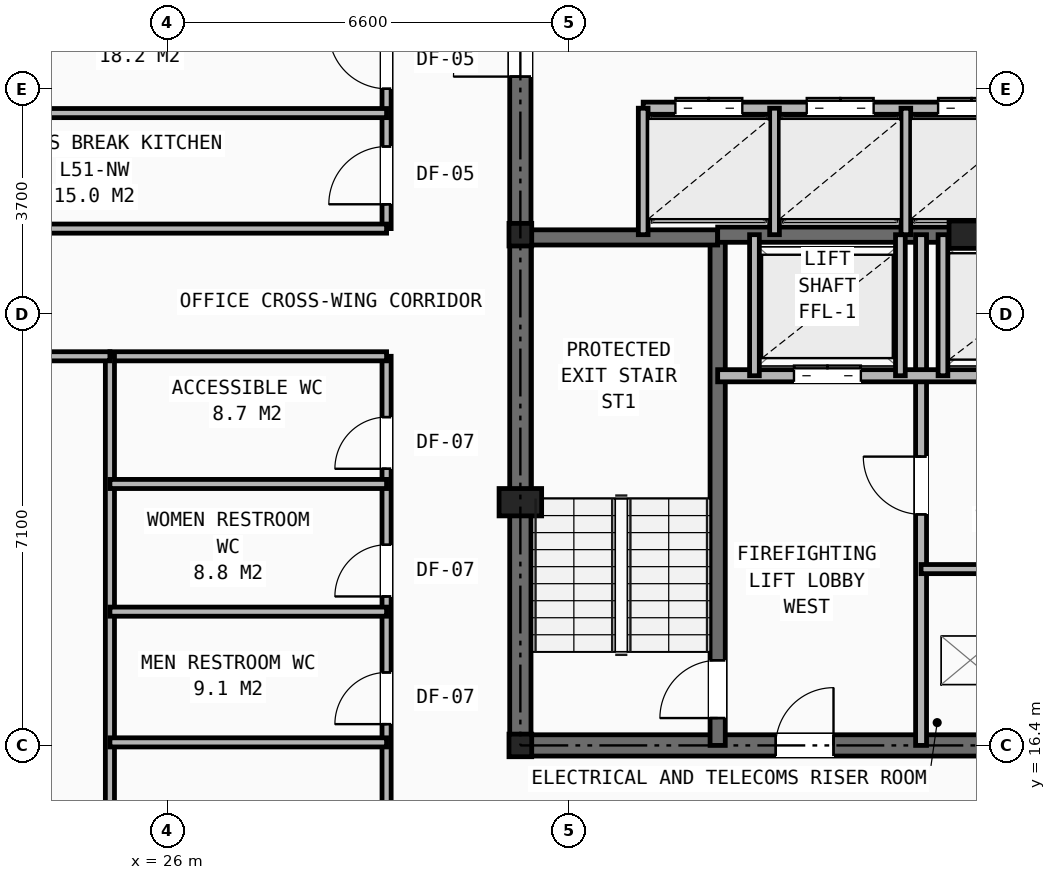
"""IFC4 building model, lengths in metres.
Left out: names, types, materials, properties, quantities, classifications, styles, units other than length and angle.
Written with IfcOpenShell. Run it as: python <this file> out.ifc"""

import sys

from ifc_helpers import new_model, si_unit, direction, frame, frame_2d, origin, origin_2d, place, context, subcontext, project, spatial, rectangle, i_section, extrude, element, fill, save


model = new_model("IFC4")
c1 = context("Model", 3, precision=1e-05, world=origin(), true_north=direction((0.0, 1.0)))
c2 = subcontext(c1, "Body", "Model", "MODEL_VIEW")
j1 = project(units=[si_unit("LENGTHUNIT", "METRE"), si_unit("PLANEANGLEUNIT", "RADIAN")], contexts=[c1])
p1 = place(None, origin())
s1 = spatial("IfcSite", under=j1, at=p1, CompositionType="ELEMENT")
p2 = place(p1, origin())
s2 = spatial("IfcBuilding", under=s1, at=p2, CompositionType="ELEMENT")
p3 = place(p2, frame((0.0, 0.0, 179.25)))
s3 = spatial("IfcBuildingStorey", under=s2, at=p3, CompositionType="ELEMENT", Elevation=179.25)
for number, where, z_axis, x_axis in (
    (1, (31.8, 16.4, 0.0), (0.0, 0.0, 1.0), (1.0, 0.0, 0.0)),
    (2, (31.8, 24.8, 0.0), (0.0, 0.0, 1.0), (1.0, 0.0, 0.0)),
):
    element("IfcColumn", number, at=place(p3, frame(where, z_axis=z_axis, x_axis=x_axis)), inside=s3, PredefinedType="COLUMN", context=c2, shape_type="SweptSolid", body=[
        extrude(i_section(OverallWidth=0.374, OverallDepth=0.372, WebThickness=0.016, FlangeThickness=0.026, at=origin_2d()), origin(), (0.0, 0.0, 1.0), 3.45),
    ])
for number, where, z_axis, x_axis in (
    (3, (31.8, 20.4, 0.0), (0.0, 0.0, 1.0), (1.0, 0.0, 0.0)),
    (4, (39.2, 24.8, 0.0), (0.0, 0.0, 1.0), (1.0, 0.0, 0.0)),
):
    element("IfcColumn", number, at=place(p3, frame(where, z_axis=z_axis, x_axis=x_axis)), inside=s3, PredefinedType="PILASTER", context=c2, shape_type="SweptSolid", body=[
        extrude(rectangle(XDim=0.7, YDim=0.45, at=origin_2d()), origin(), (0.0, 0.0, 1.0), 3.45),
    ])
p4 = place(p3, frame((31.8, 16.4, 0.0), z_axis=(0.0, 0.0, 1.0), x_axis=(1.0, 0.0, 0.0)))
e5 = element("IfcWall", 5, at=p4, inside=s3, PredefinedType="SHEAR", context=c2, shape_type="SweptSolid", body=[
    extrude(rectangle(XDim=16.4, YDim=0.35, at=frame_2d((8.2, 0.0))), origin(), (0.0, 0.0, 1.0), 3.21),
])
p5 = place(p4, frame((7.75, 0.0, 0.0)))
e6 = element("IfcOpeningElement", 6, at=p5, cuts=e5, PredefinedType="OPENING", context=c2, shape_type="SweptSolid", body=[
    extrude(rectangle(XDim=0.9, YDim=2.1, at=frame_2d((0.45, 1.05))), frame((0.0, 0.185, 0.0), z_axis=(0.0, -1.0, 0.0), x_axis=(1.0, 0.0, 0.0)), (0.0, 0.0, 1.0), 0.37),
])
p6 = place(p4, frame((4.2, 0.0, 0.0)))
e7 = element("IfcOpeningElement", 7, at=p6, cuts=e5, PredefinedType="OPENING", context=c2, shape_type="SweptSolid", body=[
    extrude(rectangle(XDim=0.95, YDim=2.1, at=frame_2d((0.475, 1.05))), frame((0.0, 0.185, 0.0), z_axis=(0.0, -1.0, 0.0), x_axis=(1.0, 0.0, 0.0)), (0.0, 0.0, 1.0), 0.37),
])
p7 = place(p4, frame((10.6, 0.0, 0.0)))
e8 = element("IfcOpeningElement", 8, at=p7, cuts=e5, PredefinedType="OPENING", context=c2, shape_type="SweptSolid", body=[
    extrude(rectangle(XDim=0.95, YDim=2.1, at=frame_2d((0.475, 1.05))), frame((0.0, 0.185, 0.0), z_axis=(0.0, -1.0, 0.0), x_axis=(1.0, 0.0, 0.0)), (0.0, 0.0, 1.0), 0.37),
])
p8 = place(p3, frame((31.8, 16.4, 0.0), z_axis=(0.0, 0.0, 1.0), x_axis=(0.0, 1.0, 0.0)))
e9 = element("IfcWall", 9, at=p8, inside=s3, PredefinedType="SHEAR", context=c2, shape_type="SweptSolid", body=[
    extrude(rectangle(XDim=14.8, YDim=0.35, at=frame_2d((7.4, 0.0))), origin(), (0.0, 0.0, 1.0), 3.21),
])
p9 = place(p8, frame((11.0, 0.0, 0.0)))
e10 = element("IfcOpeningElement", 10, at=p9, cuts=e9, PredefinedType="OPENING", context=c2, shape_type="SweptSolid", body=[
    extrude(rectangle(XDim=1.1, YDim=2.15, at=frame_2d((0.55, 1.075))), frame((0.0, 0.185, 0.0), z_axis=(0.0, -1.0, 0.0), x_axis=(1.0, 0.0, 0.0)), (0.0, 0.0, 1.0), 0.37),
])
p10 = place(p3, frame((35.045, 16.4, 0.0), z_axis=(0.0, 0.0, 1.0), x_axis=(0.0, 1.0, 0.0)))
e11 = element("IfcWall", 11, at=p10, inside=s3, PredefinedType="SHEAR", context=c2, shape_type="SweptSolid", body=[
    extrude(rectangle(XDim=8.4, YDim=0.25, at=frame_2d((4.2, 0.0))), origin(), (0.0, 0.0, 1.0), 3.21),
])
p11 = place(p10, frame((0.45, 0.0, 0.0)))
e12 = element("IfcOpeningElement", 12, at=p11, cuts=e11, PredefinedType="OPENING", context=c2, shape_type="SweptSolid", body=[
    extrude(rectangle(XDim=0.95, YDim=2.1, at=frame_2d((0.475, 1.05))), frame((0.0, 0.135, 0.0), z_axis=(0.0, -1.0, 0.0), x_axis=(1.0, 0.0, 0.0)), (0.0, 0.0, 1.0), 0.27),
])
p12 = place(p3, frame((31.8, 24.755, 0.0), z_axis=(0.0, 0.0, 1.0), x_axis=(1.0, 0.0, 0.0)))
e13 = element("IfcWall", 13, at=p12, inside=s3, PredefinedType="SHEAR", context=c2, shape_type="SweptSolid", body=[
    extrude(rectangle(XDim=3.245, YDim=0.25, at=frame_2d((1.623, 0.0))), origin(), (0.0, 0.0, 1.0), 3.21),
])
p13 = place(p3, frame((35.045, 24.8, 0.0), z_axis=(0.0, 0.0, 1.0), x_axis=(1.0, 0.0, 0.0)))
e14 = element("IfcWall", 14, at=p13, inside=s3, PredefinedType="SHEAR", context=c2, shape_type="SweptSolid", body=[
    extrude(rectangle(XDim=9.91, YDim=0.25, at=frame_2d((4.955, 0.0))), origin(), (0.0, 0.0, 1.0), 3.21),
])
p14 = place(p3, frame((38.39, 16.4, 0.0), z_axis=(0.0, 0.0, 1.0), x_axis=(0.0, 1.0, 0.0)))
e15 = element("IfcWall", 15, at=p14, inside=s3, PredefinedType="PARTITIONING", context=c2, shape_type="SweptSolid", body=[
    extrude(rectangle(XDim=8.4, YDim=0.18, at=frame_2d((4.2, 0.0))), origin(), (0.0, 0.0, 1.0), 2.665),
])
p15 = place(p14, frame((3.8, 0.0, 0.0)))
e16 = element("IfcOpeningElement", 16, at=p15, cuts=e15, PredefinedType="OPENING", context=c2, shape_type="SweptSolid", body=[
    extrude(rectangle(XDim=0.95, YDim=2.1, at=frame_2d((0.475, 1.05))), frame((0.0, 0.1, 0.0), z_axis=(0.0, -1.0, 0.0), x_axis=(1.0, 0.0, 0.0)), (0.0, 0.0, 1.0), 0.2),
])
p16 = place(p3, frame((35.045, 22.48, 0.0), z_axis=(0.0, 0.0, 1.0), x_axis=(1.0, 0.0, 0.0)))
e17 = element("IfcWall", 17, at=p16, inside=s3, PredefinedType="SOLIDWALL", context=c2, shape_type="SweptSolid", body=[
    extrude(rectangle(XDim=9.91, YDim=0.2, at=frame_2d((4.955, 0.0))), origin(), (0.0, 0.0, 1.0), 3.21),
])
p17 = place(p16, frame((1.255, 0.0, 0.0)))
e18 = element("IfcOpeningElement", 18, at=p17, cuts=e17, PredefinedType="OPENING", context=c2, shape_type="SweptSolid", body=[
    extrude(rectangle(XDim=1.1, YDim=2.15, at=frame_2d((0.55, 1.075))), frame((0.0, 0.11, 0.0), z_axis=(0.0, -1.0, 0.0), x_axis=(1.0, 0.0, 0.0)), (0.0, 0.0, 1.0), 0.22),
])
p18 = place(p16, frame((7.555, 0.0, 0.0)))
e19 = element("IfcOpeningElement", 19, at=p18, cuts=e17, PredefinedType="OPENING", context=c2, shape_type="SweptSolid", body=[
    extrude(rectangle(XDim=1.1, YDim=2.15, at=frame_2d((0.55, 1.075))), frame((0.0, 0.11, 0.0), z_axis=(0.0, -1.0, 0.0), x_axis=(1.0, 0.0, 0.0)), (0.0, 0.0, 1.0), 0.22),
])
p19 = place(p16, frame((4.405, 0.0, 0.0)))
e20 = element("IfcOpeningElement", 20, at=p19, cuts=e17, PredefinedType="OPENING", context=c2, shape_type="SweptSolid", body=[
    extrude(rectangle(XDim=1.1, YDim=2.15, at=frame_2d((0.55, 1.075))), frame((0.0, 0.11, 0.0), z_axis=(0.0, -1.0, 0.0), x_axis=(1.0, 0.0, 0.0)), (0.0, 0.0, 1.0), 0.22),
])
p20 = place(p3, frame((38.39, 19.3, 0.0), z_axis=(0.0, 0.0, 1.0), x_axis=(1.0, 0.0, 0.0)))
e21 = element("IfcWall", 21, at=p20, inside=s3, PredefinedType="PARTITIONING", context=c2, shape_type="SweptSolid", body=[
    extrude(rectangle(XDim=3.22, YDim=0.15, at=frame_2d((1.61, 0.0))), origin(), (0.0, 0.0, 1.0), 3.21),
])
for number, where, z_axis, x_axis in (
    (22, (35.65, 22.48, 0.0), (0.0, 0.0, 1.0), (0.0, 1.0, 0.0)),
    (23, (38.05, 22.48, 0.0), (0.0, 0.0, 1.0), (0.0, 1.0, 0.0)),
    (24, (38.75, 22.48, 0.0), (0.0, 0.0, 1.0), (0.0, 1.0, 0.0)),
):
    element("IfcWall", number, at=place(p3, frame(where, z_axis=z_axis, x_axis=x_axis)), inside=s3, PredefinedType="SOLIDWALL", context=c2, shape_type="SweptSolid", body=[
        extrude(rectangle(XDim=2.32, YDim=0.16, at=frame_2d((1.16, 0.0))), origin(), (0.0, 0.0, 1.0), 3.21),
    ])
p21 = place(p3, frame((33.82, 26.88, 0.0), z_axis=(0.0, 0.0, 1.0), x_axis=(1.0, 0.0, 0.0)))
e25 = element("IfcWall", 25, at=p21, inside=s3, PredefinedType="SOLIDWALL", context=c2, shape_type="SweptSolid", body=[
    extrude(rectangle(XDim=14.38, YDim=0.2, at=frame_2d((7.19, 0.0))), origin(), (0.0, 0.0, 1.0), 2.665),
])
p22 = place(p21, frame((0.53, 0.0, 0.0)))
e26 = element("IfcOpeningElement", 26, at=p22, cuts=e25, PredefinedType="OPENING", context=c2, shape_type="SweptSolid", body=[
    extrude(rectangle(XDim=1.1, YDim=2.15, at=frame_2d((0.55, 1.075))), frame((0.0, 0.11, 0.0), z_axis=(0.0, -1.0, 0.0), x_axis=(1.0, 0.0, 0.0)), (0.0, 0.0, 1.0), 0.22),
])
p23 = place(p21, frame((2.69, 0.0, 0.0)))
e27 = element("IfcOpeningElement", 27, at=p23, cuts=e25, PredefinedType="OPENING", context=c2, shape_type="SweptSolid", body=[
    extrude(rectangle(XDim=1.1, YDim=2.15, at=frame_2d((0.55, 1.075))), frame((0.0, 0.11, 0.0), z_axis=(0.0, -1.0, 0.0), x_axis=(1.0, 0.0, 0.0)), (0.0, 0.0, 1.0), 0.22),
])
p24 = place(p21, frame((4.85, 0.0, 0.0)))
e28 = element("IfcOpeningElement", 28, at=p24, cuts=e25, PredefinedType="OPENING", context=c2, shape_type="SweptSolid", body=[
    extrude(rectangle(XDim=1.1, YDim=2.15, at=frame_2d((0.55, 1.075))), frame((0.0, 0.11, 0.0), z_axis=(0.0, -1.0, 0.0), x_axis=(1.0, 0.0, 0.0)), (0.0, 0.0, 1.0), 0.22),
])
p25 = place(p21, frame((7.01, 0.0, 0.0)))
e29 = element("IfcOpeningElement", 29, at=p25, cuts=e25, PredefinedType="OPENING", context=c2, shape_type="SweptSolid", body=[
    extrude(rectangle(XDim=1.1, YDim=2.15, at=frame_2d((0.55, 1.075))), frame((0.0, 0.11, 0.0), z_axis=(0.0, -1.0, 0.0), x_axis=(1.0, 0.0, 0.0)), (0.0, 0.0, 1.0), 0.22),
])
for number, where, z_axis, x_axis in (
    (30, (33.82, 24.8, 0.0), (0.0, 0.0, 1.0), (0.0, 1.0, 0.0)),
    (31, (35.98, 24.8, 0.0), (0.0, 0.0, 1.0), (0.0, 1.0, 0.0)),
    (32, (38.14, 24.8, 0.0), (0.0, 0.0, 1.0), (0.0, 1.0, 0.0)),
):
    element("IfcWall", number, at=place(p3, frame(where, z_axis=z_axis, x_axis=x_axis)), inside=s3, PredefinedType="SOLIDWALL", context=c2, shape_type="SweptSolid", body=[
        extrude(rectangle(XDim=2.08, YDim=0.16, at=frame_2d((1.04, 0.0))), origin(), (0.0, 0.0, 1.0), 3.21),
    ])
p26 = place(p3, frame((29.6, 14.1, 0.0), z_axis=(0.0, 0.0, 1.0), x_axis=(0.0, 1.0, 0.0)))
e33 = element("IfcWall", 33, at=p26, inside=s3, PredefinedType="PARTITIONING", context=c2, shape_type="SweptSolid", body=[
    extrude(rectangle(XDim=8.7, YDim=0.15, at=frame_2d((4.35, 0.0))), origin(), (0.0, 0.0, 1.0), 3.21),
])
p27 = place(p26, frame((2.65, 0.0, 0.0)))
e34 = element("IfcOpeningElement", 34, at=p27, cuts=e33, PredefinedType="OPENING", context=c2, shape_type="SweptSolid", body=[
    extrude(rectangle(XDim=0.85, YDim=2.05, at=frame_2d((0.425, 1.025))), frame((0.0, 0.085, 0.0), z_axis=(0.0, -1.0, 0.0), x_axis=(1.0, 0.0, 0.0)), (0.0, 0.0, 1.0), 0.17),
])
p28 = place(p26, frame((4.75, 0.0, 0.0)))
e35 = element("IfcOpeningElement", 35, at=p28, cuts=e33, PredefinedType="OPENING", context=c2, shape_type="SweptSolid", body=[
    extrude(rectangle(XDim=0.85, YDim=2.05, at=frame_2d((0.425, 1.025))), frame((0.0, 0.085, 0.0), z_axis=(0.0, -1.0, 0.0), x_axis=(1.0, 0.0, 0.0)), (0.0, 0.0, 1.0), 0.17),
])
p29 = place(p26, frame((6.85, 0.0, 0.0)))
e36 = element("IfcOpeningElement", 36, at=p29, cuts=e33, PredefinedType="OPENING", context=c2, shape_type="SweptSolid", body=[
    extrude(rectangle(XDim=0.85, YDim=2.05, at=frame_2d((0.425, 1.025))), frame((0.0, 0.085, 0.0), z_axis=(0.0, -1.0, 0.0), x_axis=(1.0, 0.0, 0.0)), (0.0, 0.0, 1.0), 0.17),
])
p30 = place(p3, frame((29.6, 24.9, 0.0), z_axis=(0.0, 0.0, 1.0), x_axis=(0.0, 1.0, 0.0)))
e37 = element("IfcWall", 37, at=p30, inside=s3, PredefinedType="PARTITIONING", context=c2, shape_type="SweptSolid", body=[
    extrude(rectangle(XDim=13.9, YDim=0.15, at=frame_2d((6.95, 0.0))), origin(), (0.0, 0.0, 1.0), 2.225),
])
p31 = place(p30, frame((0.4, 0.0, 0.0)))
e38 = element("IfcOpeningElement", 38, at=p31, cuts=e37, PredefinedType="OPENING", context=c2, shape_type="SweptSolid", body=[
    extrude(rectangle(XDim=0.95, YDim=2.1, at=frame_2d((0.475, 1.05))), frame((0.0, 0.085, 0.0), z_axis=(0.0, -1.0, 0.0), x_axis=(1.0, 0.0, 0.0)), (0.0, 0.0, 1.0), 0.17),
])
p32 = place(p30, frame((2.3, 0.0, 0.0)))
e39 = element("IfcOpeningElement", 39, at=p32, cuts=e37, PredefinedType="OPENING", context=c2, shape_type="SweptSolid", body=[
    extrude(rectangle(XDim=0.95, YDim=2.1, at=frame_2d((0.475, 1.05))), frame((0.0, 0.085, 0.0), z_axis=(0.0, -1.0, 0.0), x_axis=(1.0, 0.0, 0.0)), (0.0, 0.0, 1.0), 0.17),
])
p33 = place(p30, frame((5.0, 0.0, 0.0)))
e40 = element("IfcOpeningElement", 40, at=p33, cuts=e37, PredefinedType="OPENING", context=c2, shape_type="SweptSolid", body=[
    extrude(rectangle(XDim=0.95, YDim=2.1, at=frame_2d((0.475, 1.05))), frame((0.0, 0.085, 0.0), z_axis=(0.0, -1.0, 0.0), x_axis=(1.0, 0.0, 0.0)), (0.0, 0.0, 1.0), 0.17),
])
p34 = place(p30, frame((7.7, 0.0, 0.0)))
e41 = element("IfcOpeningElement", 41, at=p34, cuts=e37, PredefinedType="OPENING", context=c2, shape_type="SweptSolid", body=[
    extrude(rectangle(XDim=0.95, YDim=2.1, at=frame_2d((0.475, 1.05))), frame((0.0, 0.085, 0.0), z_axis=(0.0, -1.0, 0.0), x_axis=(1.0, 0.0, 0.0)), (0.0, 0.0, 1.0), 0.17),
])
p35 = place(p30, frame((10.5, 0.0, 0.0)))
e42 = element("IfcOpeningElement", 42, at=p35, cuts=e37, PredefinedType="OPENING", context=c2, shape_type="SweptSolid", body=[
    extrude(rectangle(XDim=0.95, YDim=2.1, at=frame_2d((0.475, 1.05))), frame((0.0, 0.085, 0.0), z_axis=(0.0, -1.0, 0.0), x_axis=(1.0, 0.0, 0.0)), (0.0, 0.0, 1.0), 0.17),
])
p36 = place(p3, frame((25.05, 22.8, 0.0), z_axis=(0.0, 0.0, 1.0), x_axis=(1.0, 0.0, 0.0)))
e43 = element("IfcWall", 43, at=p36, inside=s3, PredefinedType="PARTITIONING", context=c2, shape_type="SweptSolid", body=[
    extrude(rectangle(XDim=4.55, YDim=0.15, at=frame_2d((2.275, 0.0))), origin(), (0.0, 0.0, 1.0), 3.21),
])
p37 = place(p3, frame((20.394, 24.9, 0.0), z_axis=(0.0, 0.0, 1.0), x_axis=(1.0, 0.0, 0.0)))
e44 = element("IfcWall", 44, at=p37, inside=s3, PredefinedType="PARTITIONING", context=c2, shape_type="SweptSolid", body=[
    extrude(rectangle(XDim=9.206, YDim=0.15, at=frame_2d((4.603, 0.0))), origin(), (0.0, 0.0, 1.0), 2.589),
])
p38 = place(p3, frame((25.05, 14.1, 0.0), z_axis=(0.0, 0.0, 1.0), x_axis=(0.0, 1.0, 0.0)))
e45 = element("IfcWall", 45, at=p38, inside=s3, PredefinedType="PARTITIONING", context=c2, shape_type="SweptSolid", body=[
    extrude(rectangle(XDim=8.7, YDim=0.15, at=frame_2d((4.35, 0.0))), origin(), (0.0, 0.0, 1.0), 3.21),
])
for number, where, z_axis, x_axis in (
    (46, (25.05, 16.45, 0.0), (0.0, 0.0, 1.0), (1.0, 0.0, 0.0)),
    (47, (25.05, 18.6, 0.0), (0.0, 0.0, 1.0), (1.0, 0.0, 0.0)),
    (48, (25.05, 20.7, 0.0), (0.0, 0.0, 1.0), (1.0, 0.0, 0.0)),
):
    element("IfcWall", number, at=place(p3, frame(where, z_axis=z_axis, x_axis=x_axis)), inside=s3, PredefinedType="PARTITIONING", context=c2, shape_type="SweptSolid", body=[
        extrude(rectangle(XDim=4.55, YDim=0.15, at=frame_2d((2.275, 0.0))), origin(), (0.0, 0.0, 1.0), 3.21),
    ])
p39 = place(p3, frame((20.5, 22.8, 0.0), z_axis=(0.0, 0.0, 1.0), x_axis=(1.0, 0.0, 0.0)))
e49 = element("IfcWall", 49, at=p39, inside=s3, PredefinedType="PARTITIONING", context=c2, shape_type="SweptSolid", body=[
    extrude(rectangle(XDim=4.55, YDim=0.15, at=frame_2d((2.275, 0.0))), origin(), (0.0, 0.0, 1.0), 3.21),
])
p40 = place(p39, frame((1.4, 0.0, 0.0)))
e50 = element("IfcOpeningElement", 50, at=p40, cuts=e49, PredefinedType="OPENING", context=c2, shape_type="SweptSolid", body=[
    extrude(rectangle(XDim=0.95, YDim=2.1, at=frame_2d((0.475, 1.05))), frame((0.0, 0.085, 0.0), z_axis=(0.0, -1.0, 0.0), x_axis=(1.0, 0.0, 0.0)), (0.0, 0.0, 1.0), 0.17),
])
p41 = place(p3, frame((21.588, 26.8, 0.0), z_axis=(0.0, 0.0, 1.0), x_axis=(1.0, 0.0, 0.0)))
e51 = element("IfcWall", 51, at=p41, inside=s3, PredefinedType="PARTITIONING", context=c2, shape_type="SweptSolid", body=[
    extrude(rectangle(XDim=8.012, YDim=0.15, at=frame_2d((4.006, 0.0))), origin(), (0.0, 0.0, 1.0), 2.589),
])
p42 = place(p15, origin())
e52 = element("IfcDoor", 52, at=p42, inside=s3, OperationType="SINGLE_SWING_RIGHT", PredefinedType="DOOR", context=c2, shape_type="SweptSolid", body=[
    extrude(rectangle(XDim=0.95, YDim=2.1, at=frame_2d((0.475, 1.05))), frame((0.0, 0.025, 0.0), z_axis=(0.0, -1.0, 0.0), x_axis=(1.0, 0.0, 0.0)), (0.0, 0.0, 1.0), 0.05),
])
fill(e16, e52)
p43 = place(p11, origin())
e53 = element("IfcDoor", 53, at=p43, inside=s3, OperationType="SINGLE_SWING_LEFT", PredefinedType="DOOR", context=c2, shape_type="SweptSolid", body=[
    extrude(rectangle(XDim=0.95, YDim=2.1, at=frame_2d((0.475, 1.05))), frame((0.0, 0.025, 0.0), z_axis=(0.0, -1.0, 0.0), x_axis=(1.0, 0.0, 0.0)), (0.0, 0.0, 1.0), 0.05),
])
fill(e12, e53)
p44 = place(p6, origin())
e54 = element("IfcDoor", 54, at=p44, inside=s3, OperationType="SINGLE_SWING_RIGHT", PredefinedType="DOOR", context=c2, shape_type="SweptSolid", body=[
    extrude(rectangle(XDim=0.95, YDim=2.1, at=frame_2d((0.475, 1.05))), frame((0.0, 0.025, 0.0), z_axis=(0.0, -1.0, 0.0), x_axis=(1.0, 0.0, 0.0)), (0.0, 0.0, 1.0), 0.05),
])
fill(e7, e54)
p45 = place(p17, origin())
e55 = element("IfcDoor", 55, at=p45, inside=s3, OperationType="DOUBLE_DOOR_SLIDING", PredefinedType="DOOR", context=c2, shape_type="SweptSolid", body=[
    extrude(rectangle(XDim=1.1, YDim=2.15, at=frame_2d((0.55, 1.075))), frame((0.0, 0.025, 0.0), z_axis=(0.0, -1.0, 0.0), x_axis=(1.0, 0.0, 0.0)), (0.0, 0.0, 1.0), 0.05),
])
fill(e18, e55)
p46 = place(p9, origin())
e56 = element("IfcDoor", 56, at=p46, inside=s3, OperationType="SINGLE_SWING_LEFT", PredefinedType="DOOR", context=c2, shape_type="SweptSolid", body=[
    extrude(rectangle(XDim=1.1, YDim=2.15, at=frame_2d((0.55, 1.075))), frame((0.0, 0.025, 0.0), z_axis=(0.0, -1.0, 0.0), x_axis=(1.0, 0.0, 0.0)), (0.0, 0.0, 1.0), 0.05),
])
fill(e10, e56)
p47 = place(p22, origin())
e57 = element("IfcDoor", 57, at=p47, inside=s3, OperationType="DOUBLE_DOOR_SLIDING", PredefinedType="DOOR", context=c2, shape_type="SweptSolid", body=[
    extrude(rectangle(XDim=1.1, YDim=2.15, at=frame_2d((0.55, 1.075))), frame((0.0, 0.025, 0.0), z_axis=(0.0, -1.0, 0.0), x_axis=(1.0, 0.0, 0.0)), (0.0, 0.0, 1.0), 0.05),
])
fill(e26, e57)
p48 = place(p23, origin())
e58 = element("IfcDoor", 58, at=p48, inside=s3, OperationType="DOUBLE_DOOR_SLIDING", PredefinedType="DOOR", context=c2, shape_type="SweptSolid", body=[
    extrude(rectangle(XDim=1.1, YDim=2.15, at=frame_2d((0.55, 1.075))), frame((0.0, 0.025, 0.0), z_axis=(0.0, -1.0, 0.0), x_axis=(1.0, 0.0, 0.0)), (0.0, 0.0, 1.0), 0.05),
])
fill(e27, e58)
p49 = place(p24, origin())
e59 = element("IfcDoor", 59, at=p49, inside=s3, OperationType="DOUBLE_DOOR_SLIDING", PredefinedType="DOOR", context=c2, shape_type="SweptSolid", body=[
    extrude(rectangle(XDim=1.1, YDim=2.15, at=frame_2d((0.55, 1.075))), frame((0.0, 0.025, 0.0), z_axis=(0.0, -1.0, 0.0), x_axis=(1.0, 0.0, 0.0)), (0.0, 0.0, 1.0), 0.05),
])
fill(e28, e59)
p50 = place(p27, origin())
e60 = element("IfcDoor", 60, at=p50, inside=s3, OperationType="SINGLE_SWING_LEFT", PredefinedType="DOOR", context=c2, shape_type="SweptSolid", body=[
    extrude(rectangle(XDim=0.85, YDim=2.05, at=frame_2d((0.425, 1.025))), frame((0.0, 0.025, 0.0), z_axis=(0.0, -1.0, 0.0), x_axis=(1.0, 0.0, 0.0)), (0.0, 0.0, 1.0), 0.05),
])
fill(e34, e60)
p51 = place(p28, origin())
e61 = element("IfcDoor", 61, at=p51, inside=s3, OperationType="SINGLE_SWING_LEFT", PredefinedType="DOOR", context=c2, shape_type="SweptSolid", body=[
    extrude(rectangle(XDim=0.85, YDim=2.05, at=frame_2d((0.425, 1.025))), frame((0.0, 0.025, 0.0), z_axis=(0.0, -1.0, 0.0), x_axis=(1.0, 0.0, 0.0)), (0.0, 0.0, 1.0), 0.05),
])
fill(e35, e61)
p52 = place(p29, origin())
e62 = element("IfcDoor", 62, at=p52, inside=s3, OperationType="SINGLE_SWING_LEFT", PredefinedType="DOOR", context=c2, shape_type="SweptSolid", body=[
    extrude(rectangle(XDim=0.85, YDim=2.05, at=frame_2d((0.425, 1.025))), frame((0.0, 0.025, 0.0), z_axis=(0.0, -1.0, 0.0), x_axis=(1.0, 0.0, 0.0)), (0.0, 0.0, 1.0), 0.05),
])
fill(e36, e62)
p53 = place(p31, origin())
e63 = element("IfcDoor", 63, at=p53, inside=s3, OperationType="SINGLE_SWING_LEFT", PredefinedType="DOOR", context=c2, shape_type="SweptSolid", body=[
    extrude(rectangle(XDim=0.95, YDim=2.1, at=frame_2d((0.475, 1.05))), frame((0.0, 0.025, 0.0), z_axis=(0.0, -1.0, 0.0), x_axis=(1.0, 0.0, 0.0)), (0.0, 0.0, 1.0), 0.05),
])
fill(e38, e63)
p54 = place(p32, origin())
e64 = element("IfcDoor", 64, at=p54, inside=s3, OperationType="SINGLE_SWING_RIGHT", PredefinedType="DOOR", context=c2, shape_type="SweptSolid", body=[
    extrude(rectangle(XDim=0.95, YDim=2.1, at=frame_2d((0.475, 1.05))), frame((0.0, 0.025, 0.0), z_axis=(0.0, -1.0, 0.0), x_axis=(1.0, 0.0, 0.0)), (0.0, 0.0, 1.0), 0.05),
])
fill(e39, e64)
save(model, sys.argv[1])
